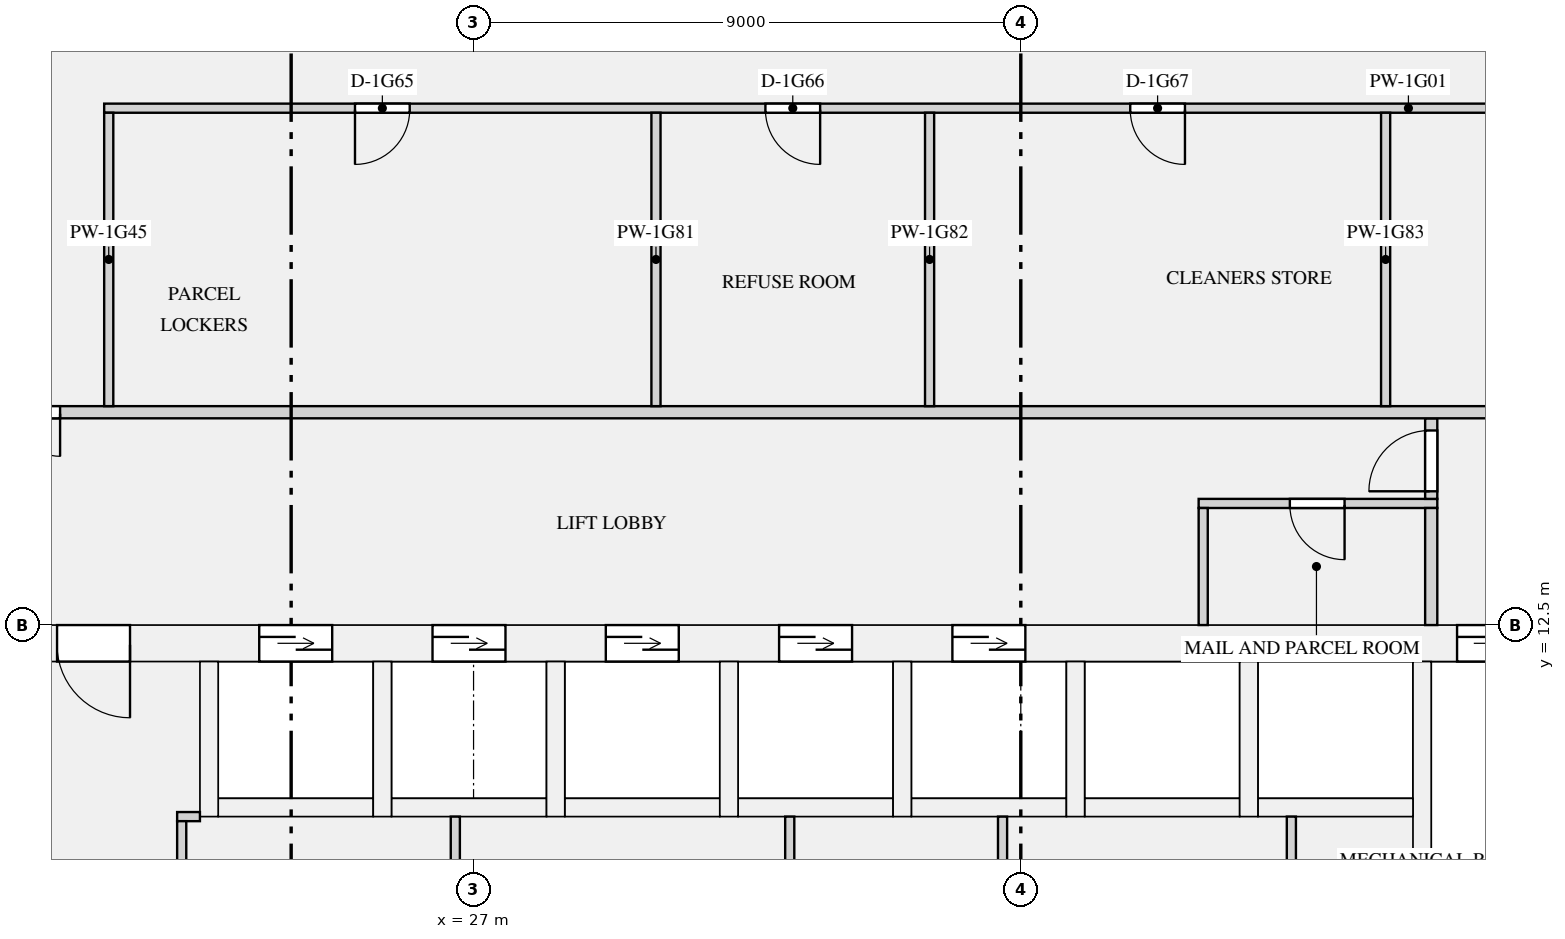
"""IFC4 building model, lengths in metres.
Left out: names, types, materials, properties, quantities, classifications, styles, units other than length and angle.
Written with IfcOpenShell. Run it as: python <this file> out.ifc"""

import sys

from ifc_helpers import new_model, si_unit, direction, frame, frame_2d, origin, place, context, subcontext, project, spatial, rectangle, extrude, element, fill, save


model = new_model("IFC4")
c1 = context("Model", 3, precision=1e-05, world=origin(), true_north=direction((0.0, 1.0)))
c2 = subcontext(c1, "Body", "Model", "MODEL_VIEW")
j1 = project(units=[si_unit("LENGTHUNIT", "METRE"), si_unit("PLANEANGLEUNIT", "RADIAN")], contexts=[c1])
p1 = place(None, origin())
s1 = spatial("IfcSite", under=j1, at=p1, CompositionType="ELEMENT")
p2 = place(p1, origin())
s2 = spatial("IfcBuilding", under=s1, at=p2, CompositionType="ELEMENT")
p3 = place(p2, frame((0.0, 0.0, 66.75)))
s3 = spatial("IfcBuildingStorey", under=s2, at=p3, CompositionType="ELEMENT", Elevation=66.75)
p4 = place(p3, frame((19.0, 12.2, 0.0), z_axis=(0.0, 0.0, 1.0), x_axis=(1.0, 0.0, 0.0)))
e1 = element("IfcWall", 1, at=p4, inside=s3, PredefinedType="SHEAR", context=c2, shape_type="SweptSolid", body=[
    extrude(rectangle(XDim=34.0, YDim=0.6, at=frame_2d((17.0, 0.0))), origin(), (0.0, 0.0, 1.0), 3.15),
])
p5 = place(p4, frame((4.475, 0.0, 0.0)))
e2 = element("IfcOpeningElement", 2, at=p5, cuts=e1, PredefinedType="OPENING", context=c2, shape_type="SweptSolid", body=[
    extrude(rectangle(XDim=1.2, YDim=2.1, at=frame_2d((0.6, 1.05))), frame((0.0, 0.31, 0.0), z_axis=(0.0, -1.0, 0.0), x_axis=(1.0, 0.0, 0.0)), (0.0, 0.0, 1.0), 0.62),
])
p6 = place(p4, frame((7.325, 0.0, 0.0)))
e3 = element("IfcOpeningElement", 3, at=p6, cuts=e1, PredefinedType="OPENING", context=c2, shape_type="SweptSolid", body=[
    extrude(rectangle(XDim=1.2, YDim=2.1, at=frame_2d((0.6, 1.05))), frame((0.0, 0.31, 0.0), z_axis=(0.0, -1.0, 0.0), x_axis=(1.0, 0.0, 0.0)), (0.0, 0.0, 1.0), 0.62),
])
p7 = place(p4, frame((10.175, 0.0, 0.0)))
e4 = element("IfcOpeningElement", 4, at=p7, cuts=e1, PredefinedType="OPENING", context=c2, shape_type="SweptSolid", body=[
    extrude(rectangle(XDim=1.2, YDim=2.1, at=frame_2d((0.6, 1.05))), frame((0.0, 0.31, 0.0), z_axis=(0.0, -1.0, 0.0), x_axis=(1.0, 0.0, 0.0)), (0.0, 0.0, 1.0), 0.62),
])
p8 = place(p4, frame((13.025, 0.0, 0.0)))
e5 = element("IfcOpeningElement", 5, at=p8, cuts=e1, PredefinedType="OPENING", context=c2, shape_type="SweptSolid", body=[
    extrude(rectangle(XDim=1.2, YDim=2.1, at=frame_2d((0.6, 1.05))), frame((0.0, 0.31, 0.0), z_axis=(0.0, -1.0, 0.0), x_axis=(1.0, 0.0, 0.0)), (0.0, 0.0, 1.0), 0.62),
])
p9 = place(p4, frame((15.875, 0.0, 0.0)))
e6 = element("IfcOpeningElement", 6, at=p9, cuts=e1, PredefinedType="OPENING", context=c2, shape_type="SweptSolid", body=[
    extrude(rectangle(XDim=1.2, YDim=2.1, at=frame_2d((0.6, 1.05))), frame((0.0, 0.31, 0.0), z_axis=(0.0, -1.0, 0.0), x_axis=(1.0, 0.0, 0.0)), (0.0, 0.0, 1.0), 0.62),
])
p10 = place(p4, frame((24.175, 0.0, 0.0)))
e7 = element("IfcOpeningElement", 7, at=p10, cuts=e1, PredefinedType="OPENING", context=c2, shape_type="SweptSolid", body=[
    extrude(rectangle(XDim=1.1, YDim=2.1, at=frame_2d((0.55, 1.05))), frame((0.0, 0.31, 0.0), z_axis=(0.0, -1.0, 0.0), x_axis=(1.0, 0.0, 0.0)), (0.0, 0.0, 1.0), 0.62),
])
p11 = place(p4, frame((26.425, 0.0, 0.0)))
e8 = element("IfcOpeningElement", 8, at=p11, cuts=e1, PredefinedType="OPENING", context=c2, shape_type="SweptSolid", body=[
    extrude(rectangle(XDim=1.1, YDim=2.1, at=frame_2d((0.55, 1.05))), frame((0.0, 0.31, 0.0), z_axis=(0.0, -1.0, 0.0), x_axis=(1.0, 0.0, 0.0)), (0.0, 0.0, 1.0), 0.62),
])
p12 = place(p4, frame((28.675, 0.0, 0.0)))
e9 = element("IfcOpeningElement", 9, at=p12, cuts=e1, PredefinedType="OPENING", context=c2, shape_type="SweptSolid", body=[
    extrude(rectangle(XDim=1.1, YDim=2.1, at=frame_2d((0.55, 1.05))), frame((0.0, 0.31, 0.0), z_axis=(0.0, -1.0, 0.0), x_axis=(1.0, 0.0, 0.0)), (0.0, 0.0, 1.0), 0.62),
])
p13 = place(p4, frame((1.15, 0.0, 0.0)))
e10 = element("IfcOpeningElement", 10, at=p13, cuts=e1, PredefinedType="OPENING", context=c2, shape_type="SweptSolid", body=[
    extrude(rectangle(XDim=1.2, YDim=2.1, at=frame_2d((0.6, 1.05))), frame((0.0, 0.31, 0.0), z_axis=(0.0, -1.0, 0.0), x_axis=(1.0, 0.0, 0.0)), (0.0, 0.0, 1.0), 0.62),
])
p14 = place(p4, frame((31.65, 0.0, 0.0)))
e11 = element("IfcOpeningElement", 11, at=p14, cuts=e1, PredefinedType="OPENING", context=c2, shape_type="SweptSolid", body=[
    extrude(rectangle(XDim=1.2, YDim=2.1, at=frame_2d((0.6, 1.05))), frame((0.0, 0.31, 0.0), z_axis=(0.0, -1.0, 0.0), x_axis=(1.0, 0.0, 0.0)), (0.0, 0.0, 1.0), 0.62),
])
p15 = place(p3, frame((22.8, 9.5, 0.0), z_axis=(0.0, 0.0, 1.0), x_axis=(1.0, 0.0, 0.0)))
e12 = element("IfcWall", 12, at=p15, inside=s3, PredefinedType="SHEAR", context=c2, shape_type="SweptSolid", body=[
    extrude(rectangle(XDim=2.55, YDim=0.3, at=frame_2d((1.275, 0.0))), origin(), (0.0, 0.0, 1.0), 3.15),
])
p16 = place(p3, frame((22.65, 9.35, 0.0), z_axis=(0.0, 0.0, 1.0), x_axis=(0.0, 1.0, 0.0)))
e13 = element("IfcWall", 13, at=p16, inside=s3, PredefinedType="SHEAR", context=c2, shape_type="SweptSolid", body=[
    extrude(rectangle(XDim=2.55, YDim=0.3, at=frame_2d((1.275, 0.0))), origin(), (0.0, 0.0, 1.0), 3.15),
])
p17 = place(p3, frame((25.65, 9.5, 0.0), z_axis=(0.0, 0.0, 1.0), x_axis=(1.0, 0.0, 0.0)))
e14 = element("IfcWall", 14, at=p17, inside=s3, PredefinedType="SHEAR", context=c2, shape_type="SweptSolid", body=[
    extrude(rectangle(XDim=2.55, YDim=0.3, at=frame_2d((1.275, 0.0))), origin(), (0.0, 0.0, 1.0), 3.15),
])
p18 = place(p3, frame((25.5, 9.35, 0.0), z_axis=(0.0, 0.0, 1.0), x_axis=(0.0, 1.0, 0.0)))
e15 = element("IfcWall", 15, at=p18, inside=s3, PredefinedType="SHEAR", context=c2, shape_type="SweptSolid", body=[
    extrude(rectangle(XDim=2.55, YDim=0.3, at=frame_2d((1.275, 0.0))), origin(), (0.0, 0.0, 1.0), 3.15),
])
p19 = place(p3, frame((28.5, 9.5, 0.0), z_axis=(0.0, 0.0, 1.0), x_axis=(1.0, 0.0, 0.0)))
e16 = element("IfcWall", 16, at=p19, inside=s3, PredefinedType="SHEAR", context=c2, shape_type="SweptSolid", body=[
    extrude(rectangle(XDim=2.55, YDim=0.3, at=frame_2d((1.275, 0.0))), origin(), (0.0, 0.0, 1.0), 3.15),
])
for number, where, z_axis, x_axis in (
    (17, (28.35, 9.35, 0.0), (0.0, 0.0, 1.0), (0.0, 1.0, 0.0)),
    (18, (31.35, 9.5, 0.0), (0.0, 0.0, 1.0), (1.0, 0.0, 0.0)),
    (19, (31.2, 9.35, 0.0), (0.0, 0.0, 1.0), (0.0, 1.0, 0.0)),
):
    element("IfcWall", number, at=place(p3, frame(where, z_axis=z_axis, x_axis=x_axis)), inside=s3, PredefinedType="SHEAR", context=c2, shape_type="SweptSolid", body=[
        extrude(rectangle(XDim=2.55, YDim=0.3, at=frame_2d((1.275, 0.0))), origin(), (0.0, 0.0, 1.0), 3.15),
    ])
p20 = place(p3, frame((34.2, 9.5, 0.0), z_axis=(0.0, 0.0, 1.0), x_axis=(1.0, 0.0, 0.0)))
e20 = element("IfcWall", 20, at=p20, inside=s3, PredefinedType="SHEAR", context=c2, shape_type="SweptSolid", body=[
    extrude(rectangle(XDim=2.55, YDim=0.3, at=frame_2d((1.275, 0.0))), origin(), (0.0, 0.0, 1.0), 3.15),
])
p21 = place(p3, frame((34.05, 9.35, 0.0), z_axis=(0.0, 0.0, 1.0), x_axis=(0.0, 1.0, 0.0)))
e21 = element("IfcWall", 21, at=p21, inside=s3, PredefinedType="SHEAR", context=c2, shape_type="SweptSolid", body=[
    extrude(rectangle(XDim=2.55, YDim=0.3, at=frame_2d((1.275, 0.0))), origin(), (0.0, 0.0, 1.0), 3.15),
])
p22 = place(p3, frame((37.05, 9.5, 0.0), z_axis=(0.0, 0.0, 1.0), x_axis=(1.0, 0.0, 0.0)))
e22 = element("IfcWall", 22, at=p22, inside=s3, PredefinedType="SHEAR", context=c2, shape_type="SweptSolid", body=[
    extrude(rectangle(XDim=2.55, YDim=0.3, at=frame_2d((1.275, 0.0))), origin(), (0.0, 0.0, 1.0), 3.15),
])
p23 = place(p3, frame((36.9, 9.35, 0.0), z_axis=(0.0, 0.0, 1.0), x_axis=(0.0, 1.0, 0.0)))
e23 = element("IfcWall", 23, at=p23, inside=s3, PredefinedType="SHEAR", context=c2, shape_type="SweptSolid", body=[
    extrude(rectangle(XDim=2.55, YDim=0.3, at=frame_2d((1.275, 0.0))), origin(), (0.0, 0.0, 1.0), 3.15),
])
p24 = place(p3, frame((39.9, 9.5, 0.0), z_axis=(0.0, 0.0, 1.0), x_axis=(1.0, 0.0, 0.0)))
e24 = element("IfcWall", 24, at=p24, inside=s3, PredefinedType="SHEAR", context=c2, shape_type="SweptSolid", body=[
    extrude(rectangle(XDim=2.55, YDim=0.3, at=frame_2d((1.275, 0.0))), origin(), (0.0, 0.0, 1.0), 3.15),
])
p25 = place(p3, frame((39.75, 9.35, 0.0), z_axis=(0.0, 0.0, 1.0), x_axis=(0.0, 1.0, 0.0)))
e25 = element("IfcWall", 25, at=p25, inside=s3, PredefinedType="SHEAR", context=c2, shape_type="SweptSolid", body=[
    extrude(rectangle(XDim=2.55, YDim=0.3, at=frame_2d((1.275, 0.0))), origin(), (0.0, 0.0, 1.0), 3.15),
])
p26 = place(p3, frame((42.6, 8.25, 0.0), z_axis=(0.0, 0.0, 1.0), x_axis=(0.0, 1.0, 0.0)))
e26 = element("IfcWall", 26, at=p26, inside=s3, PredefinedType="SHEAR", context=c2, shape_type="SweptSolid", body=[
    extrude(rectangle(XDim=3.65, YDim=0.3, at=frame_2d((1.825, 0.0))), origin(), (0.0, 0.0, 1.0), 3.15),
])
p27 = place(p3, frame((22.125, 9.35, 0.0), z_axis=(0.0, 0.0, 1.0), x_axis=(1.0, 0.0, 0.0)))
e27 = element("IfcWall", 27, at=p27, inside=s3, PredefinedType="PARTITIONING", context=c2, shape_type="SweptSolid", body=[
    extrude(rectangle(XDim=0.375, YDim=0.15, at=frame_2d((0.188, 0.0))), origin(), (0.0, 0.0, 1.0), 2.83),
])
p28 = place(p3, frame((38.925, 14.5, 0.0), z_axis=(0.0, 0.0, 1.0), x_axis=(1.0, 0.0, 0.0)))
e28 = element("IfcWall", 28, at=p28, inside=s3, PredefinedType="PARTITIONING", context=c2, shape_type="SweptSolid", body=[
    extrude(rectangle(XDim=3.925, YDim=0.15, at=frame_2d((1.962, 0.0))), origin(), (0.0, 0.0, 1.0), 2.83),
])
p29 = place(p28, frame((1.5, 0.0, 0.0)))
e29 = element("IfcOpeningElement", 29, at=p29, cuts=e28, PredefinedType="OPENING", context=c2, shape_type="SweptSolid", body=[
    extrude(rectangle(XDim=0.9, YDim=2.1, at=frame_2d((0.45, 1.05))), frame((0.0, 0.085, 0.0), z_axis=(0.0, -1.0, 0.0), x_axis=(1.0, 0.0, 0.0)), (0.0, 0.0, 1.0), 0.17),
])
p30 = place(p3, frame((22.2, 6.725, 0.0), z_axis=(0.0, 0.0, 1.0), x_axis=(0.0, 1.0, 0.0)))
e30 = element("IfcWall", 30, at=p30, inside=s3, PredefinedType="PARTITIONING", context=c2, shape_type="SweptSolid", body=[
    extrude(rectangle(XDim=2.55, YDim=0.15, at=frame_2d((1.275, 0.0))), origin(), (0.0, 0.0, 1.0), 2.83),
])
for number, where, z_axis, x_axis in (
    (31, (26.7, 6.725, 0.0), (0.0, 0.0, 1.0), (0.0, 1.0, 0.0)),
    (32, (32.2, 6.725, 0.0), (0.0, 0.0, 1.0), (0.0, 1.0, 0.0)),
    (33, (35.7, 6.725, 0.0), (0.0, 0.0, 1.0), (0.0, 1.0, 0.0)),
    (34, (40.45, 6.725, 0.0), (0.0, 0.0, 1.0), (0.0, 1.0, 0.0)),
):
    element("IfcWall", number, at=place(p3, frame(where, z_axis=z_axis, x_axis=x_axis)), inside=s3, PredefinedType="PARTITIONING", context=c2, shape_type="SweptSolid", body=[
        extrude(rectangle(XDim=2.625, YDim=0.15, at=frame_2d((1.312, 0.0))), origin(), (0.0, 0.0, 1.0), 2.83),
    ])
p31 = place(p3, frame((39.0, 12.5, 0.0), z_axis=(0.0, 0.0, 1.0), x_axis=(0.0, 1.0, 0.0)))
e35 = element("IfcWall", 35, at=p31, inside=s3, PredefinedType="PARTITIONING", context=c2, shape_type="SweptSolid", body=[
    extrude(rectangle(XDim=1.925, YDim=0.15, at=frame_2d((0.962, 0.0))), origin(), (0.0, 0.0, 1.0), 2.83),
])
p32 = place(p3, frame((42.75, 12.5, 0.0), z_axis=(0.0, 0.0, 1.0), x_axis=(0.0, 1.0, 0.0)))
e36 = element("IfcWall", 36, at=p32, inside=s3, PredefinedType="PARTITIONING", context=c2, shape_type="SweptSolid", body=[
    extrude(rectangle(XDim=1.925, YDim=0.2, at=frame_2d((0.962, 0.0))), origin(), (0.0, 0.0, 1.0), 2.83),
])
p33 = place(p3, frame((42.75, 14.575, 0.0), z_axis=(0.0, 0.0, 1.0), x_axis=(0.0, 1.0, 0.0)))
e37 = element("IfcWall", 37, at=p33, inside=s3, PredefinedType="PARTITIONING", context=c2, shape_type="SweptSolid", body=[
    extrude(rectangle(XDim=1.325, YDim=0.2, at=frame_2d((0.663, 0.0))), origin(), (0.0, 0.0, 1.0), 2.83),
])
p34 = place(p33, frame((0.125, 0.0, 0.0)))
e38 = element("IfcOpeningElement", 38, at=p34, cuts=e37, PredefinedType="OPENING", context=c2, shape_type="SweptSolid", body=[
    extrude(rectangle(XDim=1.0, YDim=2.1, at=frame_2d((0.5, 1.05))), frame((0.0, 0.11, 0.0), z_axis=(0.0, -1.0, 0.0), x_axis=(1.0, 0.0, 0.0)), (0.0, 0.0, 1.0), 0.22),
])
p35 = place(p3, frame((20.925, 21.0, 0.0), z_axis=(0.0, 0.0, 1.0), x_axis=(1.0, 0.0, 0.0)))
e39 = element("IfcWall", 39, at=p35, inside=s3, PredefinedType="PARTITIONING", context=c2, shape_type="SweptSolid", body=[
    extrude(rectangle(XDim=30.15, YDim=0.15, at=frame_2d((15.075, 0.0))), origin(), (0.0, 0.0, 1.0), 2.83),
])
p36 = place(p35, frame((4.125, 0.0, 0.0)))
e40 = element("IfcOpeningElement", 40, at=p36, cuts=e39, PredefinedType="OPENING", context=c2, shape_type="SweptSolid", body=[
    extrude(rectangle(XDim=0.9, YDim=2.1, at=frame_2d((0.45, 1.05))), frame((0.0, 0.085, 0.0), z_axis=(0.0, -1.0, 0.0), x_axis=(1.0, 0.0, 0.0)), (0.0, 0.0, 1.0), 0.17),
])
p37 = place(p35, frame((10.875, 0.0, 0.0)))
e41 = element("IfcOpeningElement", 41, at=p37, cuts=e39, PredefinedType="OPENING", context=c2, shape_type="SweptSolid", body=[
    extrude(rectangle(XDim=0.9, YDim=2.1, at=frame_2d((0.45, 1.05))), frame((0.0, 0.085, 0.0), z_axis=(0.0, -1.0, 0.0), x_axis=(1.0, 0.0, 0.0)), (0.0, 0.0, 1.0), 0.17),
])
p38 = place(p35, frame((16.875, 0.0, 0.0)))
e42 = element("IfcOpeningElement", 42, at=p38, cuts=e39, PredefinedType="OPENING", context=c2, shape_type="SweptSolid", body=[
    extrude(rectangle(XDim=0.9, YDim=2.1, at=frame_2d((0.45, 1.05))), frame((0.0, 0.085, 0.0), z_axis=(0.0, -1.0, 0.0), x_axis=(1.0, 0.0, 0.0)), (0.0, 0.0, 1.0), 0.17),
])
p39 = place(p35, frame((25.125, 0.0, 0.0)))
e43 = element("IfcOpeningElement", 43, at=p39, cuts=e39, PredefinedType="OPENING", context=c2, shape_type="SweptSolid", body=[
    extrude(rectangle(XDim=0.9, YDim=2.1, at=frame_2d((0.45, 1.05))), frame((0.0, 0.085, 0.0), z_axis=(0.0, -1.0, 0.0), x_axis=(1.0, 0.0, 0.0)), (0.0, 0.0, 1.0), 0.17),
])
p40 = place(p3, frame((17.9, 16.0, 0.0), z_axis=(0.0, 0.0, 1.0), x_axis=(1.0, 0.0, 0.0)))
e44 = element("IfcWall", 44, at=p40, inside=s3, PredefinedType="PARTITIONING", context=c2, shape_type="SweptSolid", body=[
    extrude(rectangle(XDim=36.2, YDim=0.2, at=frame_2d((18.1, 0.0))), origin(), (0.0, 0.0, 1.0), 2.83),
])
p41 = place(p40, frame((0.9, 0.0, 0.0)))
e45 = element("IfcOpeningElement", 45, at=p41, cuts=e44, PredefinedType="OPENING", context=c2, shape_type="SweptSolid", body=[
    extrude(rectangle(XDim=1.4, YDim=2.1, at=frame_2d((0.7, 1.05))), frame((0.0, 0.11, 0.0), z_axis=(0.0, -1.0, 0.0), x_axis=(1.0, 0.0, 0.0)), (0.0, 0.0, 1.0), 0.22),
])
p42 = place(p40, frame((33.9, 0.0, 0.0)))
e46 = element("IfcOpeningElement", 46, at=p42, cuts=e44, PredefinedType="OPENING", context=c2, shape_type="SweptSolid", body=[
    extrude(rectangle(XDim=1.4, YDim=2.1, at=frame_2d((0.7, 1.05))), frame((0.0, 0.11, 0.0), z_axis=(0.0, -1.0, 0.0), x_axis=(1.0, 0.0, 0.0)), (0.0, 0.0, 1.0), 0.22),
])
for number, where, z_axis, x_axis in (
    (47, (21.0, 16.1, 0.0), (0.0, 0.0, 1.0), (0.0, 1.0, 0.0)),
    (48, (30.0, 16.1, 0.0), (0.0, 0.0, 1.0), (0.0, 1.0, 0.0)),
    (49, (34.5, 16.1, 0.0), (0.0, 0.0, 1.0), (0.0, 1.0, 0.0)),
    (50, (42.0, 16.1, 0.0), (0.0, 0.0, 1.0), (0.0, 1.0, 0.0)),
):
    element("IfcWall", number, at=place(p3, frame(where, z_axis=z_axis, x_axis=x_axis)), inside=s3, PredefinedType="PARTITIONING", context=c2, shape_type="SweptSolid", body=[
        extrude(rectangle(XDim=4.825, YDim=0.15, at=frame_2d((2.413, 0.0))), origin(), (0.0, 0.0, 1.0), 2.83),
    ])
p43 = place(p5, origin())
e51 = element("IfcDoor", 51, at=p43, inside=s3, OperationType="DOUBLE_DOOR_SLIDING", PredefinedType="DOOR", context=c2, shape_type="SweptSolid", body=[
    extrude(rectangle(XDim=1.2, YDim=2.1, at=frame_2d((0.6, 1.05))), frame((0.0, 0.025, 0.0), z_axis=(0.0, -1.0, 0.0), x_axis=(1.0, 0.0, 0.0)), (0.0, 0.0, 1.0), 0.05),
])
fill(e2, e51)
p44 = place(p6, origin())
e52 = element("IfcDoor", 52, at=p44, inside=s3, OperationType="DOUBLE_DOOR_SLIDING", PredefinedType="DOOR", context=c2, shape_type="SweptSolid", body=[
    extrude(rectangle(XDim=1.2, YDim=2.1, at=frame_2d((0.6, 1.05))), frame((0.0, 0.025, 0.0), z_axis=(0.0, -1.0, 0.0), x_axis=(1.0, 0.0, 0.0)), (0.0, 0.0, 1.0), 0.05),
])
fill(e3, e52)
p45 = place(p7, origin())
e53 = element("IfcDoor", 53, at=p45, inside=s3, OperationType="DOUBLE_DOOR_SLIDING", PredefinedType="DOOR", context=c2, shape_type="SweptSolid", body=[
    extrude(rectangle(XDim=1.2, YDim=2.1, at=frame_2d((0.6, 1.05))), frame((0.0, 0.025, 0.0), z_axis=(0.0, -1.0, 0.0), x_axis=(1.0, 0.0, 0.0)), (0.0, 0.0, 1.0), 0.05),
])
fill(e4, e53)
p46 = place(p8, origin())
e54 = element("IfcDoor", 54, at=p46, inside=s3, OperationType="DOUBLE_DOOR_SLIDING", PredefinedType="DOOR", context=c2, shape_type="SweptSolid", body=[
    extrude(rectangle(XDim=1.2, YDim=2.1, at=frame_2d((0.6, 1.05))), frame((0.0, 0.025, 0.0), z_axis=(0.0, -1.0, 0.0), x_axis=(1.0, 0.0, 0.0)), (0.0, 0.0, 1.0), 0.05),
])
fill(e5, e54)
p47 = place(p9, origin())
e55 = element("IfcDoor", 55, at=p47, inside=s3, OperationType="DOUBLE_DOOR_SLIDING", PredefinedType="DOOR", context=c2, shape_type="SweptSolid", body=[
    extrude(rectangle(XDim=1.2, YDim=2.1, at=frame_2d((0.6, 1.05))), frame((0.0, 0.025, 0.0), z_axis=(0.0, -1.0, 0.0), x_axis=(1.0, 0.0, 0.0)), (0.0, 0.0, 1.0), 0.05),
])
fill(e6, e55)
p48 = place(p10, origin())
e56 = element("IfcDoor", 56, at=p48, inside=s3, OperationType="DOUBLE_DOOR_SLIDING", PredefinedType="DOOR", context=c2, shape_type="SweptSolid", body=[
    extrude(rectangle(XDim=1.1, YDim=2.1, at=frame_2d((0.55, 1.05))), frame((0.0, 0.025, 0.0), z_axis=(0.0, -1.0, 0.0), x_axis=(1.0, 0.0, 0.0)), (0.0, 0.0, 1.0), 0.05),
])
fill(e7, e56)
p49 = place(p29, frame((0.9, 0.0, 0.0), z_axis=(0.0, 0.0, 1.0), x_axis=(-1.0, 0.0, 0.0)))
e57 = element("IfcDoor", 57, at=p49, inside=s3, OperationType="SINGLE_SWING_LEFT", PredefinedType="DOOR", context=c2, shape_type="SweptSolid", body=[
    extrude(rectangle(XDim=0.9, YDim=2.1, at=frame_2d((0.45, 1.05))), frame((0.0, 0.025, 0.0), z_axis=(0.0, -1.0, 0.0), x_axis=(1.0, 0.0, 0.0)), (0.0, 0.0, 1.0), 0.05),
])
fill(e29, e57)
p50 = place(p13, frame((1.2, 0.0, 0.0), z_axis=(0.0, 0.0, 1.0), x_axis=(-1.0, 0.0, 0.0)))
e58 = element("IfcDoor", 58, at=p50, inside=s3, OperationType="SINGLE_SWING_LEFT", PredefinedType="DOOR", context=c2, shape_type="SweptSolid", body=[
    extrude(rectangle(XDim=1.2, YDim=2.1, at=frame_2d((0.6, 1.05))), frame((0.0, 0.025, 0.0), z_axis=(0.0, -1.0, 0.0), x_axis=(1.0, 0.0, 0.0)), (0.0, 0.0, 1.0), 0.05),
])
fill(e10, e58)
p51 = place(p34, origin())
e59 = element("IfcDoor", 59, at=p51, inside=s3, OperationType="SINGLE_SWING_LEFT", PredefinedType="DOOR", context=c2, shape_type="SweptSolid", body=[
    extrude(rectangle(XDim=1.0, YDim=2.1, at=frame_2d((0.5, 1.05))), frame((0.0, 0.025, 0.0), z_axis=(0.0, -1.0, 0.0), x_axis=(1.0, 0.0, 0.0)), (0.0, 0.0, 1.0), 0.05),
])
fill(e38, e59)
p52 = place(p41, frame((1.4, 0.0, 0.0), z_axis=(0.0, 0.0, 1.0), x_axis=(-1.0, 0.0, 0.0)))
e60 = element("IfcDoor", 60, at=p52, inside=s3, OperationType="DOUBLE_DOOR_SINGLE_SWING", PredefinedType="DOOR", context=c2, shape_type="SweptSolid", body=[
    extrude(rectangle(XDim=1.4, YDim=2.1, at=frame_2d((0.7, 1.05))), frame((0.0, 0.025, 0.0), z_axis=(0.0, -1.0, 0.0), x_axis=(1.0, 0.0, 0.0)), (0.0, 0.0, 1.0), 0.05),
])
fill(e45, e60)
p53 = place(p36, frame((0.9, 0.0, 0.0), z_axis=(0.0, 0.0, 1.0), x_axis=(-1.0, 0.0, 0.0)))
e61 = element("IfcDoor", 61, at=p53, inside=s3, OperationType="SINGLE_SWING_RIGHT", PredefinedType="DOOR", context=c2, shape_type="SweptSolid", body=[
    extrude(rectangle(XDim=0.9, YDim=2.1, at=frame_2d((0.45, 1.05))), frame((0.0, 0.025, 0.0), z_axis=(0.0, -1.0, 0.0), x_axis=(1.0, 0.0, 0.0)), (0.0, 0.0, 1.0), 0.05),
])
fill(e40, e61)
p54 = place(p37, frame((0.9, 0.0, 0.0), z_axis=(0.0, 0.0, 1.0), x_axis=(-1.0, 0.0, 0.0)))
e62 = element("IfcDoor", 62, at=p54, inside=s3, OperationType="SINGLE_SWING_LEFT", PredefinedType="DOOR", context=c2, shape_type="SweptSolid", body=[
    extrude(rectangle(XDim=0.9, YDim=2.1, at=frame_2d((0.45, 1.05))), frame((0.0, 0.025, 0.0), z_axis=(0.0, -1.0, 0.0), x_axis=(1.0, 0.0, 0.0)), (0.0, 0.0, 1.0), 0.05),
])
fill(e41, e62)
p55 = place(p38, frame((0.9, 0.0, 0.0), z_axis=(0.0, 0.0, 1.0), x_axis=(-1.0, 0.0, 0.0)))
e63 = element("IfcDoor", 63, at=p55, inside=s3, OperationType="SINGLE_SWING_LEFT", PredefinedType="DOOR", context=c2, shape_type="SweptSolid", body=[
    extrude(rectangle(XDim=0.9, YDim=2.1, at=frame_2d((0.45, 1.05))), frame((0.0, 0.025, 0.0), z_axis=(0.0, -1.0, 0.0), x_axis=(1.0, 0.0, 0.0)), (0.0, 0.0, 1.0), 0.05),
])
fill(e42, e63)
save(model, sys.argv[1])
